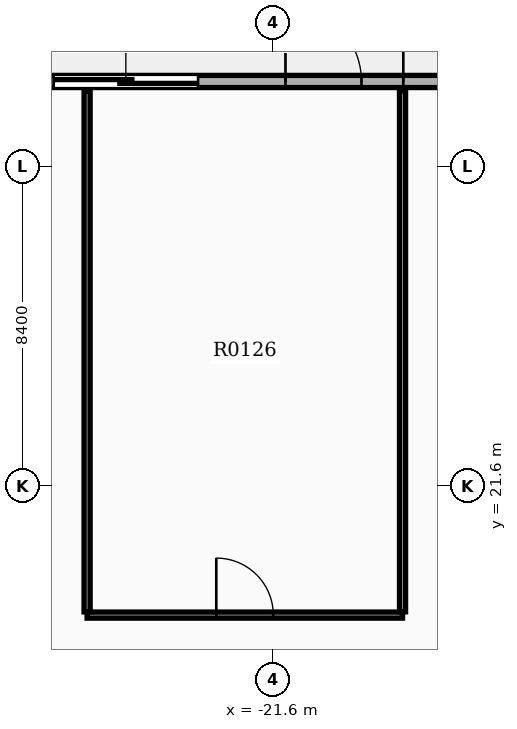
"""IFC4 building model, lengths in metres.
Left out: names, types, materials, properties, quantities, classifications, styles, units other than length and angle.
Written with IfcOpenShell. Run it as: python <this file> out.ifc"""

import sys

from ifc_helpers import new_model, si_unit, direction, frame, frame_2d, origin, place, context, subcontext, project, spatial, rectangle, extrude, element, fill, save


model = new_model("IFC4")
c1 = context("Model", 3, precision=1e-05, world=origin(), true_north=direction((0.0, 1.0)))
c2 = subcontext(c1, "Body", "Model", "MODEL_VIEW")
j1 = project(units=[si_unit("LENGTHUNIT", "METRE"), si_unit("PLANEANGLEUNIT", "RADIAN")], contexts=[c1])
p1 = place(None, origin())
s1 = spatial("IfcSite", under=j1, at=p1, CompositionType="ELEMENT")
p2 = place(p1, origin())
s2 = spatial("IfcBuilding", under=s1, at=p2, CompositionType="ELEMENT")
p3 = place(p2, origin())
s3 = spatial("IfcBuildingStorey", under=s2, at=p3, CompositionType="ELEMENT", Elevation=0.0)
p4 = place(p3, frame((-28.88, 32.24, 0.0), z_axis=(0.0, 0.0, 1.0), x_axis=(1.0, 0.0, 0.0)))
e1 = element("IfcWall", 1, at=p4, inside=s3, PredefinedType="STANDARD", context=c2, shape_type="SweptSolid", body=[
    extrude(rectangle(XDim=19.48, YDim=0.32, at=frame_2d((9.74, 0.0))), origin(), (0.0, 0.0, 1.0), 2.68),
])
p5 = place(p4, frame((1.5, 0.0, 0.0)))
e2 = element("IfcOpeningElement", 2, at=p5, cuts=e1, PredefinedType="OPENING", context=c2, shape_type="SweptSolid", body=[
    extrude(rectangle(XDim=3.8, YDim=2.5, at=frame_2d((1.9, 1.25))), frame((0.0, 0.17, 0.0), z_axis=(0.0, -1.0, 0.0), x_axis=(1.0, 0.0, 0.0)), (0.0, 0.0, 1.0), 0.34),
])
p6 = place(p4, frame((7.6, 0.0, 0.0)))
e3 = element("IfcOpeningElement", 3, at=p6, cuts=e1, PredefinedType="OPENING", context=c2, shape_type="SweptSolid", body=[
    extrude(rectangle(XDim=2.0, YDim=2.25, at=frame_2d((1.0, 1.125))), frame((0.0, 0.17, 0.0), z_axis=(0.0, -1.0, 0.0), x_axis=(1.0, 0.0, 0.0)), (0.0, 0.0, 1.0), 0.34),
])
p7 = place(p4, frame((10.7, 0.0, 0.0)))
e4 = element("IfcOpeningElement", 4, at=p7, cuts=e1, PredefinedType="OPENING", context=c2, shape_type="SweptSolid", body=[
    extrude(rectangle(XDim=1.8, YDim=2.25, at=frame_2d((0.9, 1.125))), frame((0.0, 0.17, 0.0), z_axis=(0.0, -1.0, 0.0), x_axis=(1.0, 0.0, 0.0)), (0.0, 0.0, 1.0), 0.34),
])
p8 = place(p4, frame((13.1, 0.0, 0.65)))
e5 = element("IfcOpeningElement", 5, at=p8, cuts=e1, PredefinedType="OPENING", context=c2, shape_type="SweptSolid", body=[
    extrude(rectangle(XDim=1.8, YDim=1.8, at=frame_2d((0.9, 0.9))), frame((0.0, 0.17, 0.0), z_axis=(0.0, -1.0, 0.0), x_axis=(1.0, 0.0, 0.0)), (0.0, 0.0, 1.0), 0.34),
])
p9 = place(p3, frame((-26.5, 18.2, 0.0), z_axis=(0.0, 0.0, 1.0), x_axis=(1.0, 0.0, 0.0)))
e6 = element("IfcWall", 6, at=p9, inside=s3, PredefinedType="PARTITIONING", context=c2, shape_type="SweptSolid", body=[
    extrude(rectangle(XDim=8.3, YDim=0.16, at=frame_2d((4.15, 0.0))), origin(), (0.0, 0.0, 1.0), 2.67),
])
p10 = place(p9, frame((3.4, 0.0, 0.0)))
e7 = element("IfcOpeningElement", 7, at=p10, cuts=e6, PredefinedType="OPENING", context=c2, shape_type="SweptSolid", body=[
    extrude(rectangle(XDim=1.5, YDim=2.15, at=frame_2d((0.75, 1.075))), frame((0.0, 0.09, 0.0), z_axis=(0.0, -1.0, 0.0), x_axis=(1.0, 0.0, 0.0)), (0.0, 0.0, 1.0), 0.18),
])
for number, where, z_axis, x_axis in (
    (8, (-26.5, 18.285, 0.0), (0.0, 0.0, 1.0), (0.0, 1.0, 0.0)),
    (9, (-18.2, 18.285, 0.0), (0.0, 0.0, 1.0), (0.0, 1.0, 0.0)),
):
    element("IfcWall", number, at=place(p3, frame(where, z_axis=z_axis, x_axis=x_axis)), inside=s3, PredefinedType="PARTITIONING", context=c2, shape_type="SweptSolid", body=[
        extrude(rectangle(XDim=13.71, YDim=0.16, at=frame_2d((6.855, 0.0))), origin(), (0.0, 0.0, 1.0), 2.67),
    ])
p11 = place(p5, origin())
e10 = element("IfcDoor", 10, at=p11, inside=s3, OperationType="ROLLINGUP", PredefinedType="GATE", context=c2, shape_type="SweptSolid", body=[
    extrude(rectangle(XDim=3.8, YDim=2.5, at=frame_2d((1.9, 1.25))), frame((0.0, 0.025, 0.0), z_axis=(0.0, -1.0, 0.0), x_axis=(1.0, 0.0, 0.0)), (0.0, 0.0, 1.0), 0.05),
])
fill(e2, e10)
p12 = place(p6, origin())
e11 = element("IfcDoor", 11, at=p12, inside=s3, OperationType="DOUBLE_DOOR_SINGLE_SWING", PredefinedType="DOOR", context=c2, shape_type="SweptSolid", body=[
    extrude(rectangle(XDim=2.0, YDim=2.25, at=frame_2d((1.0, 1.125))), frame((0.0, 0.025, 0.0), z_axis=(0.0, -1.0, 0.0), x_axis=(1.0, 0.0, 0.0)), (0.0, 0.0, 1.0), 0.05),
])
fill(e3, e11)
p13 = place(p7, origin())
e12 = element("IfcDoor", 12, at=p13, inside=s3, OperationType="DOUBLE_DOOR_SINGLE_SWING", PredefinedType="DOOR", context=c2, shape_type="SweptSolid", body=[
    extrude(rectangle(XDim=1.8, YDim=2.25, at=frame_2d((0.9, 1.125))), frame((0.0, 0.025, 0.0), z_axis=(0.0, -1.0, 0.0), x_axis=(1.0, 0.0, 0.0)), (0.0, 0.0, 1.0), 0.05),
])
fill(e4, e12)
p14 = place(p10, origin())
e13 = element("IfcDoor", 13, at=p14, inside=s3, OperationType="DOUBLE_DOOR_SINGLE_SWING", PredefinedType="DOOR", context=c2, shape_type="SweptSolid", body=[
    extrude(rectangle(XDim=1.5, YDim=2.15, at=frame_2d((0.75, 1.075))), frame((0.0, 0.025, 0.0), z_axis=(0.0, -1.0, 0.0), x_axis=(1.0, 0.0, 0.0)), (0.0, 0.0, 1.0), 0.05),
])
fill(e7, e13)
save(model, sys.argv[1])
